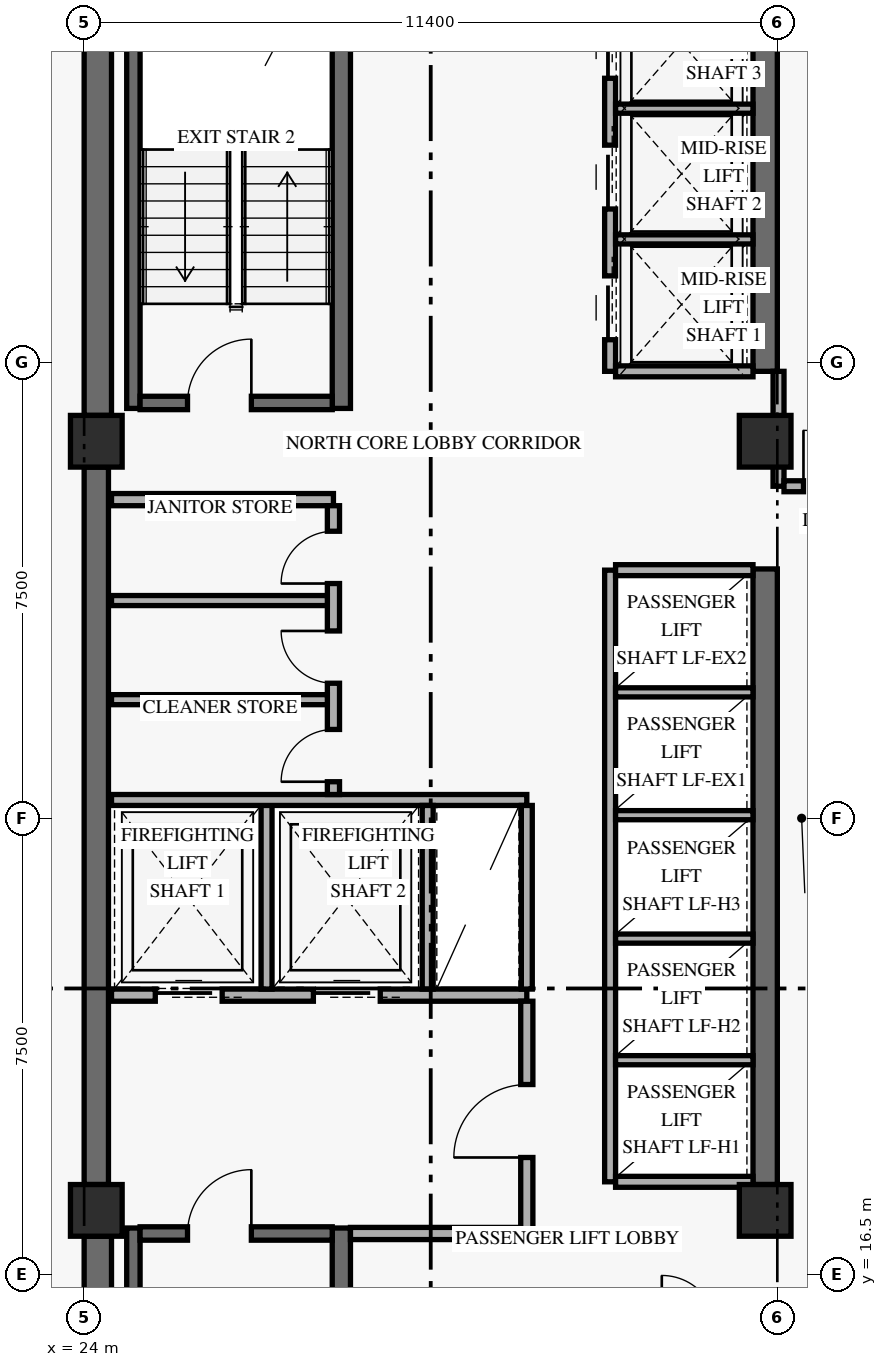
"""IFC4 building model, lengths in metres.
Left out: names, types, materials, properties, quantities, classifications, styles, units other than length and angle.
Written with IfcOpenShell. Run it as: python <this file> out.ifc"""

import sys

from ifc_helpers import new_model, si_unit, direction, frame, frame_2d, origin, origin_2d, place, context, subcontext, project, spatial, rectangle, extrude, element, fill, save


model = new_model("IFC4")
c1 = context("Model", 3, precision=1e-05, world=origin(), true_north=direction((0.0, 1.0)))
c2 = subcontext(c1, "Body", "Model", "MODEL_VIEW")
j1 = project(units=[si_unit("LENGTHUNIT", "METRE"), si_unit("PLANEANGLEUNIT", "RADIAN")], contexts=[c1])
p1 = place(None, origin())
s1 = spatial("IfcSite", under=j1, at=p1, CompositionType="ELEMENT")
p2 = place(p1, origin())
s2 = spatial("IfcBuilding", under=s1, at=p2, CompositionType="ELEMENT")
p3 = place(p2, frame((0.0, 0.0, 113.4)))
s3 = spatial("IfcBuildingStorey", under=s2, at=p3, CompositionType="ELEMENT", Elevation=113.4)
p4 = place(p3, frame((24.225, 9.675, 0.0), z_axis=(0.0, 0.0, 1.0), x_axis=(0.0, 1.0, 0.0)))
e1 = element("IfcWall", 1, at=p4, inside=s3, PredefinedType="SHEAR", context=c2, shape_type="SweptSolid", body=[
    extrude(rectangle(XDim=7.45, YDim=0.45, at=frame_2d((3.725, 0.0))), origin(), (0.0, 0.0, 1.0), 2.739),
])
p5 = place(p3, frame((24.2, 17.975, 0.0), z_axis=(0.0, 0.0, 1.0), x_axis=(0.0, 1.0, 0.0)))
e2 = element("IfcWall", 2, at=p5, inside=s3, PredefinedType="SHEAR", context=c2, shape_type="SweptSolid", body=[
    extrude(rectangle(XDim=11.8, YDim=0.4, at=frame_2d((5.9, 0.0))), origin(), (0.0, 0.0, 1.0), 2.739),
])
p6 = place(p3, frame((24.225, 30.625, 0.0), z_axis=(0.0, 0.0, 1.0), x_axis=(0.0, 1.0, 0.0)))
e3 = element("IfcWall", 3, at=p6, inside=s3, PredefinedType="SHEAR", context=c2, shape_type="SweptSolid", body=[
    extrude(rectangle(XDim=7.7, YDim=0.45, at=frame_2d((3.85, 0.0))), origin(), (0.0, 0.0, 1.0), 2.739),
])
p7 = place(p3, frame((35.2, 17.975, 0.0), z_axis=(0.0, 0.0, 1.0), x_axis=(0.0, 1.0, 0.0)))
e4 = element("IfcWall", 4, at=p7, inside=s3, PredefinedType="SHEAR", context=c2, shape_type="SweptSolid", body=[
    extrude(rectangle(XDim=10.125, YDim=0.4, at=frame_2d((5.062, 0.0))), origin(), (0.0, 0.0, 1.0), 2.739),
])
p8 = place(p3, frame((35.2, 31.35, 0.0), z_axis=(0.0, 0.0, 1.0), x_axis=(0.0, 1.0, 0.0)))
e5 = element("IfcWall", 5, at=p8, inside=s3, PredefinedType="SHEAR", context=c2, shape_type="SweptSolid", body=[
    extrude(rectangle(XDim=6.975, YDim=0.4, at=frame_2d((3.487, 0.0))), origin(), (0.0, 0.0, 1.0), 2.739),
])
p9 = place(p3, frame((24.81, 9.5, 0.0), z_axis=(0.0, 0.0, 1.0), x_axis=(0.0, 1.0, 0.0)))
e6 = element("IfcWall", 6, at=p9, inside=s3, PredefinedType="SHEAR", context=c2, shape_type="SweptSolid", body=[
    extrude(rectangle(XDim=7.76, YDim=0.22, at=frame_2d((3.88, 0.0))), origin(), (0.0, 0.0, 1.0), 3.35),
])
p10 = place(p3, frame((28.23, 9.5, 0.0), z_axis=(0.0, 0.0, 1.0), x_axis=(0.0, 1.0, 0.0)))
e7 = element("IfcWall", 7, at=p10, inside=s3, PredefinedType="SHEAR", context=c2, shape_type="SweptSolid", body=[
    extrude(rectangle(XDim=7.76, YDim=0.3, at=frame_2d((3.88, 0.0))), origin(), (0.0, 0.0, 1.0), 3.35),
])
p11 = place(p3, frame((24.92, 17.17, 0.0), z_axis=(0.0, 0.0, 1.0), x_axis=(1.0, 0.0, 0.0)))
e8 = element("IfcWall", 8, at=p11, inside=s3, PredefinedType="SHEAR", context=c2, shape_type="SweptSolid", body=[
    extrude(rectangle(XDim=3.16, YDim=0.22, at=frame_2d((1.58, 0.0))), origin(), (0.0, 0.0, 1.0), 3.35),
])
p12 = place(p11, frame((0.78, 0.0, 0.0)))
e9 = element("IfcOpeningElement", 9, at=p12, cuts=e8, PredefinedType="OPENING", context=c2, shape_type="SweptSolid", body=[
    extrude(rectangle(XDim=1.05, YDim=2.15, at=frame_2d((0.525, 1.075))), frame((0.0, 0.12, 0.0), z_axis=(0.0, -1.0, 0.0), x_axis=(1.0, 0.0, 0.0)), (0.0, 0.0, 1.0), 0.24),
])
p13 = place(p3, frame((24.81, 30.74, 0.0), z_axis=(0.0, 0.0, 1.0), x_axis=(0.0, 1.0, 0.0)))
e10 = element("IfcWall", 10, at=p13, inside=s3, PredefinedType="SHEAR", context=c2, shape_type="SweptSolid", body=[
    extrude(rectangle(XDim=7.76, YDim=0.22, at=frame_2d((3.88, 0.0))), origin(), (0.0, 0.0, 1.0), 3.35),
])
p14 = place(p3, frame((28.23, 30.74, 0.0), z_axis=(0.0, 0.0, 1.0), x_axis=(0.0, 1.0, 0.0)))
e11 = element("IfcWall", 11, at=p14, inside=s3, PredefinedType="SHEAR", context=c2, shape_type="SweptSolid", body=[
    extrude(rectangle(XDim=7.76, YDim=0.3, at=frame_2d((3.88, 0.0))), origin(), (0.0, 0.0, 1.0), 3.35),
])
p15 = place(p3, frame((24.92, 30.83, 0.0), z_axis=(0.0, 0.0, 1.0), x_axis=(1.0, 0.0, 0.0)))
e12 = element("IfcWall", 12, at=p15, inside=s3, PredefinedType="SHEAR", context=c2, shape_type="SweptSolid", body=[
    extrude(rectangle(XDim=3.16, YDim=0.22, at=frame_2d((1.58, 0.0))), origin(), (0.0, 0.0, 1.0), 3.35),
])
p16 = place(p15, frame((0.78, 0.0, 0.0)))
e13 = element("IfcOpeningElement", 13, at=p16, cuts=e12, PredefinedType="OPENING", context=c2, shape_type="SweptSolid", body=[
    extrude(rectangle(XDim=1.05, YDim=2.15, at=frame_2d((0.525, 1.075))), frame((0.0, 0.12, 0.0), z_axis=(0.0, -1.0, 0.0), x_axis=(1.0, 0.0, 0.0)), (0.0, 0.0, 1.0), 0.24),
])
for number, where, z_axis, x_axis in (
    (14, (24.2, 17.55, 0.0), (0.0, 0.0, 1.0), (1.0, 0.0, 0.0)),
    (15, (24.2, 30.2, 0.0), (0.0, 0.0, 1.0), (1.0, 0.0, 0.0)),
    (16, (35.2, 17.55, 0.0), (0.0, 0.0, 1.0), (1.0, 0.0, 0.0)),
    (17, (35.2, 30.2, 0.0), (0.0, 0.0, 1.0), (1.0, 0.0, 0.0)),
):
    element("IfcColumn", number, at=place(p3, frame(where, z_axis=z_axis, x_axis=x_axis)), inside=s3, PredefinedType="COLUMN", context=c2, shape_type="SweptSolid", body=[
        extrude(rectangle(XDim=0.85, YDim=0.85, at=origin_2d()), origin(), (0.0, 0.0, 1.0), 3.6),
    ])
p17 = place(p3, frame((24.45, 21.09, 0.0), z_axis=(0.0, 0.0, 1.0), x_axis=(1.0, 0.0, 0.0)))
e18 = element("IfcWall", 18, at=p17, inside=s3, PredefinedType="STANDARD", context=c2, shape_type="SweptSolid", body=[
    extrude(rectangle(XDim=6.83, YDim=0.2, at=frame_2d((3.415, 0.0))), origin(), (0.0, 0.0, 1.0), 3.35),
])
p18 = place(p17, frame((0.72, 0.0, 0.0)))
e19 = element("IfcOpeningElement", 19, at=p18, cuts=e18, PredefinedType="OPENING", context=c2, shape_type="SweptSolid", body=[
    extrude(rectangle(XDim=1.1, YDim=2.2, at=frame_2d((0.55, 1.1))), frame((0.0, 0.11, 0.0), z_axis=(0.0, -1.0, 0.0), x_axis=(1.0, 0.0, 0.0)), (0.0, 0.0, 1.0), 0.22),
])
p19 = place(p17, frame((3.32, 0.0, 0.0)))
e20 = element("IfcOpeningElement", 20, at=p19, cuts=e18, PredefinedType="OPENING", context=c2, shape_type="SweptSolid", body=[
    extrude(rectangle(XDim=1.1, YDim=2.2, at=frame_2d((0.55, 1.1))), frame((0.0, 0.11, 0.0), z_axis=(0.0, -1.0, 0.0), x_axis=(1.0, 0.0, 0.0)), (0.0, 0.0, 1.0), 0.22),
])
p20 = place(p3, frame((28.38, 17.17, 0.0), z_axis=(0.0, 0.0, 1.0), x_axis=(1.0, 0.0, 0.0)))
e21 = element("IfcWall", 21, at=p20, inside=s3, PredefinedType="STANDARD", context=c2, shape_type="SweptSolid", body=[
    extrude(rectangle(XDim=2.9, YDim=0.2, at=frame_2d((1.45, 0.0))), origin(), (0.0, 0.0, 1.0), 3.35),
])
p21 = place(p3, frame((31.28, 17.07, 0.0), z_axis=(0.0, 0.0, 1.0), x_axis=(0.0, 1.0, 0.0)))
e22 = element("IfcWall", 22, at=p21, inside=s3, PredefinedType="STANDARD", context=c2, shape_type="SweptSolid", body=[
    extrude(rectangle(XDim=3.92, YDim=0.2, at=frame_2d((1.96, 0.0))), origin(), (0.0, 0.0, 1.0), 2.721),
])
p22 = place(p21, frame((1.35, 0.0, 0.0)))
e23 = element("IfcOpeningElement", 23, at=p22, cuts=e22, PredefinedType="OPENING", context=c2, shape_type="SweptSolid", body=[
    extrude(rectangle(XDim=1.2, YDim=2.15, at=frame_2d((0.6, 1.075))), frame((0.0, 0.11, 0.0), z_axis=(0.0, -1.0, 0.0), x_axis=(1.0, 0.0, 0.0)), (0.0, 0.0, 1.0), 0.22),
])
p23 = place(p3, frame((27.0, 21.19, 0.0), z_axis=(0.0, 0.0, 1.0), x_axis=(0.0, 1.0, 0.0)))
e24 = element("IfcWall", 24, at=p23, inside=s3, PredefinedType="STANDARD", context=c2, shape_type="SweptSolid", body=[
    extrude(rectangle(XDim=3.11, YDim=0.18, at=frame_2d((1.555, 0.0))), origin(), (0.0, 0.0, 1.0), 3.35),
])
p24 = place(p3, frame((24.45, 24.3, 0.0), z_axis=(0.0, 0.0, 1.0), x_axis=(1.0, 0.0, 0.0)))
e25 = element("IfcWall", 25, at=p24, inside=s3, PredefinedType="STANDARD", context=c2, shape_type="SweptSolid", body=[
    extrude(rectangle(XDim=6.83, YDim=0.18, at=frame_2d((3.415, 0.0))), origin(), (0.0, 0.0, 1.0), 3.35),
])
for number, where, z_axis, x_axis in (
    (26, (29.65, 21.19, 0.0), (0.0, 0.0, 1.0), (0.0, 1.0, 0.0)),
    (27, (31.28, 21.19, 0.0), (0.0, 0.0, 1.0), (0.0, 1.0, 0.0)),
):
    element("IfcWall", number, at=place(p3, frame(where, z_axis=z_axis, x_axis=x_axis)), inside=s3, PredefinedType="STANDARD", context=c2, shape_type="SweptSolid", body=[
        extrude(rectangle(XDim=3.02, YDim=0.18, at=frame_2d((1.51, 0.0))), origin(), (0.0, 0.0, 1.0), 3.35),
    ])
p25 = place(p3, frame((24.45, 29.24, 0.0), z_axis=(0.0, 0.0, 1.0), x_axis=(1.0, 0.0, 0.0)))
e28 = element("IfcWall", 28, at=p25, inside=s3, PredefinedType="STANDARD", context=c2, shape_type="SweptSolid", body=[
    extrude(rectangle(XDim=3.65, YDim=0.2, at=frame_2d((1.825, 0.0))), origin(), (0.0, 0.0, 1.0), 3.35),
])
p26 = place(p3, frame((28.1, 24.39, 0.0), z_axis=(0.0, 0.0, 1.0), x_axis=(0.0, 1.0, 0.0)))
e29 = element("IfcWall", 29, at=p26, inside=s3, PredefinedType="STANDARD", context=c2, shape_type="SweptSolid", body=[
    extrude(rectangle(XDim=4.75, YDim=0.2, at=frame_2d((2.375, 0.0))), origin(), (0.0, 0.0, 1.0), 3.35),
])
p27 = place(p26, frame((0.21, 0.0, 0.0)))
e30 = element("IfcOpeningElement", 30, at=p27, cuts=e29, PredefinedType="OPENING", context=c2, shape_type="SweptSolid", body=[
    extrude(rectangle(XDim=0.86, YDim=2.1, at=frame_2d((0.43, 1.05))), frame((0.0, 0.11, 0.0), z_axis=(0.0, -1.0, 0.0), x_axis=(1.0, 0.0, 0.0)), (0.0, 0.0, 1.0), 0.22),
])
p28 = place(p26, frame((1.83, 0.0, 0.0)))
e31 = element("IfcOpeningElement", 31, at=p28, cuts=e29, PredefinedType="OPENING", context=c2, shape_type="SweptSolid", body=[
    extrude(rectangle(XDim=0.86, YDim=2.1, at=frame_2d((0.43, 1.05))), frame((0.0, 0.11, 0.0), z_axis=(0.0, -1.0, 0.0), x_axis=(1.0, 0.0, 0.0)), (0.0, 0.0, 1.0), 0.22),
])
p29 = place(p26, frame((3.47, 0.0, 0.0)))
e32 = element("IfcOpeningElement", 32, at=p29, cuts=e29, PredefinedType="OPENING", context=c2, shape_type="SweptSolid", body=[
    extrude(rectangle(XDim=0.86, YDim=2.1, at=frame_2d((0.43, 1.05))), frame((0.0, 0.11, 0.0), z_axis=(0.0, -1.0, 0.0), x_axis=(1.0, 0.0, 0.0)), (0.0, 0.0, 1.0), 0.22),
])
for number, where, z_axis, x_axis in (
    (33, (24.45, 25.95, 0.0), (0.0, 0.0, 1.0), (1.0, 0.0, 0.0)),
    (34, (24.45, 27.58, 0.0), (0.0, 0.0, 1.0), (1.0, 0.0, 0.0)),
):
    element("IfcWall", number, at=place(p3, frame(where, z_axis=z_axis, x_axis=x_axis)), inside=s3, PredefinedType="PARTITIONING", context=c2, shape_type="SweptSolid", body=[
        extrude(rectangle(XDim=3.55, YDim=0.165, at=frame_2d((1.775, 0.0))), origin(), (0.0, 0.0, 1.0), 3.35),
    ])
p30 = place(p3, frame((32.65, 18.02, 0.0), z_axis=(0.0, 0.0, 1.0), x_axis=(0.0, 1.0, 0.0)))
e35 = element("IfcWall", 35, at=p30, inside=s3, PredefinedType="STANDARD", context=c2, shape_type="SweptSolid", body=[
    extrude(rectangle(XDim=10.06, YDim=0.18, at=frame_2d((5.03, 0.0))), origin(), (0.0, 0.0, 1.0), 3.35),
])
for number, where, z_axis, x_axis in (
    (36, (32.74, 18.02, 0.0), (0.0, 0.0, 1.0), (1.0, 0.0, 0.0)),
    (37, (32.74, 28.08, 0.0), (0.0, 0.0, 1.0), (1.0, 0.0, 0.0)),
):
    element("IfcWall", number, at=place(p3, frame(where, z_axis=z_axis, x_axis=x_axis)), inside=s3, PredefinedType="STANDARD", context=c2, shape_type="SweptSolid", body=[
        extrude(rectangle(XDim=2.26, YDim=0.18, at=frame_2d((1.13, 0.0))), origin(), (0.0, 0.0, 1.0), 3.35),
    ])
for number, where, z_axis, x_axis in (
    (38, (32.74, 20.02, 0.0), (0.0, 0.0, 1.0), (1.0, 0.0, 0.0)),
    (39, (32.74, 22.02, 0.0), (0.0, 0.0, 1.0), (1.0, 0.0, 0.0)),
    (40, (32.74, 24.05, 0.0), (0.0, 0.0, 1.0), (1.0, 0.0, 0.0)),
    (41, (32.74, 26.07, 0.0), (0.0, 0.0, 1.0), (1.0, 0.0, 0.0)),
):
    element("IfcWall", number, at=place(p3, frame(where, z_axis=z_axis, x_axis=x_axis)), inside=s3, PredefinedType="STANDARD", context=c2, shape_type="SweptSolid", body=[
        extrude(rectangle(XDim=2.26, YDim=0.15, at=frame_2d((1.13, 0.0))), origin(), (0.0, 0.0, 1.0), 3.35),
    ])
p31 = place(p3, frame((32.65, 31.35, 0.0), z_axis=(0.0, 0.0, 1.0), x_axis=(0.0, 1.0, 0.0)))
e42 = element("IfcWall", 42, at=p31, inside=s3, PredefinedType="STANDARD", context=c2, shape_type="SweptSolid", body=[
    extrude(rectangle(XDim=7.2, YDim=0.18, at=frame_2d((3.6, 0.0))), origin(), (0.0, 0.0, 1.0), 3.35),
])
p32 = place(p31, frame((0.52, 0.0, 0.0)))
e43 = element("IfcOpeningElement", 43, at=p32, cuts=e42, PredefinedType="OPENING", context=c2, shape_type="SweptSolid", body=[
    extrude(rectangle(XDim=1.05, YDim=2.2, at=frame_2d((0.525, 1.1))), frame((0.0, 0.1, 0.0), z_axis=(0.0, -1.0, 0.0), x_axis=(1.0, 0.0, 0.0)), (0.0, 0.0, 1.0), 0.2),
])
p33 = place(p31, frame((2.67, 0.0, 0.0)))
e44 = element("IfcOpeningElement", 44, at=p33, cuts=e42, PredefinedType="OPENING", context=c2, shape_type="SweptSolid", body=[
    extrude(rectangle(XDim=1.05, YDim=2.2, at=frame_2d((0.525, 1.1))), frame((0.0, 0.1, 0.0), z_axis=(0.0, -1.0, 0.0), x_axis=(1.0, 0.0, 0.0)), (0.0, 0.0, 1.0), 0.2),
])
p34 = place(p31, frame((4.82, 0.0, 0.0)))
e45 = element("IfcOpeningElement", 45, at=p34, cuts=e42, PredefinedType="OPENING", context=c2, shape_type="SweptSolid", body=[
    extrude(rectangle(XDim=1.05, YDim=2.2, at=frame_2d((0.525, 1.1))), frame((0.0, 0.1, 0.0), z_axis=(0.0, -1.0, 0.0), x_axis=(1.0, 0.0, 0.0)), (0.0, 0.0, 1.0), 0.2),
])
p35 = place(p3, frame((32.74, 31.35, 0.0), z_axis=(0.0, 0.0, 1.0), x_axis=(1.0, 0.0, 0.0)))
e46 = element("IfcWall", 46, at=p35, inside=s3, PredefinedType="STANDARD", context=c2, shape_type="SweptSolid", body=[
    extrude(rectangle(XDim=2.26, YDim=0.18, at=frame_2d((1.13, 0.0))), origin(), (0.0, 0.0, 1.0), 3.35),
])
for number, where, z_axis, x_axis in (
    (47, (32.74, 33.52, 0.0), (0.0, 0.0, 1.0), (1.0, 0.0, 0.0)),
    (48, (32.74, 35.67, 0.0), (0.0, 0.0, 1.0), (1.0, 0.0, 0.0)),
):
    element("IfcWall", number, at=place(p3, frame(where, z_axis=z_axis, x_axis=x_axis)), inside=s3, PredefinedType="STANDARD", context=c2, shape_type="SweptSolid", body=[
        extrude(rectangle(XDim=2.26, YDim=0.15, at=frame_2d((1.13, 0.0))), origin(), (0.0, 0.0, 1.0), 3.35),
    ])
p36 = place(p3, frame((35.42, 29.46, 0.0), z_axis=(0.0, 0.0, 1.0), x_axis=(0.0, 1.0, 0.0)))
e49 = element("IfcWall", 49, at=p36, inside=s3, PredefinedType="STANDARD", context=c2, shape_type="SweptSolid", body=[
    extrude(rectangle(XDim=1.89, YDim=0.18, at=frame_2d((0.945, 0.0))), origin(), (0.0, 0.0, 1.0), 2.721),
])
p37 = place(p3, frame((35.51, 29.46, 0.0), z_axis=(0.0, 0.0, 1.0), x_axis=(1.0, 0.0, 0.0)))
e50 = element("IfcWall", 50, at=p37, inside=s3, PredefinedType="STANDARD", context=c2, shape_type="SweptSolid", body=[
    extrude(rectangle(XDim=10.09, YDim=0.18, at=frame_2d((5.045, 0.0))), origin(), (0.0, 0.0, 1.0), 2.721),
])
p38 = place(p37, frame((0.32, 0.0, 0.0)))
e51 = element("IfcOpeningElement", 51, at=p38, cuts=e50, PredefinedType="OPENING", context=c2, shape_type="SweptSolid", body=[
    extrude(rectangle(XDim=0.92, YDim=2.15, at=frame_2d((0.46, 1.075))), frame((0.0, 0.1, 0.0), z_axis=(0.0, -1.0, 0.0), x_axis=(1.0, 0.0, 0.0)), (0.0, 0.0, 1.0), 0.2),
])
p39 = place(p12, frame((1.05, 0.0, 0.0), z_axis=(0.0, 0.0, 1.0), x_axis=(-1.0, 0.0, 0.0)))
e52 = element("IfcDoor", 52, at=p39, inside=s3, OperationType="SINGLE_SWING_LEFT", PredefinedType="DOOR", context=c2, shape_type="SweptSolid", body=[
    extrude(rectangle(XDim=1.05, YDim=2.15, at=frame_2d((0.525, 1.075))), frame((0.0, 0.025, 0.0), z_axis=(0.0, -1.0, 0.0), x_axis=(1.0, 0.0, 0.0)), (0.0, 0.0, 1.0), 0.05),
])
fill(e9, e52)
p40 = place(p16, origin())
e53 = element("IfcDoor", 53, at=p40, inside=s3, OperationType="SINGLE_SWING_RIGHT", PredefinedType="DOOR", context=c2, shape_type="SweptSolid", body=[
    extrude(rectangle(XDim=1.05, YDim=2.15, at=frame_2d((0.525, 1.075))), frame((0.0, 0.025, 0.0), z_axis=(0.0, -1.0, 0.0), x_axis=(1.0, 0.0, 0.0)), (0.0, 0.0, 1.0), 0.05),
])
fill(e13, e53)
p41 = place(p18, origin())
e54 = element("IfcDoor", 54, at=p41, inside=s3, OperationType="SLIDING_TO_LEFT", PredefinedType="DOOR", context=c2, shape_type="SweptSolid", body=[
    extrude(rectangle(XDim=1.1, YDim=2.2, at=frame_2d((0.55, 1.1))), frame((0.0, 0.025, 0.0), z_axis=(0.0, -1.0, 0.0), x_axis=(1.0, 0.0, 0.0)), (0.0, 0.0, 1.0), 0.05),
])
fill(e19, e54)
p42 = place(p19, origin())
e55 = element("IfcDoor", 55, at=p42, inside=s3, OperationType="SLIDING_TO_LEFT", PredefinedType="DOOR", context=c2, shape_type="SweptSolid", body=[
    extrude(rectangle(XDim=1.1, YDim=2.2, at=frame_2d((0.55, 1.1))), frame((0.0, 0.025, 0.0), z_axis=(0.0, -1.0, 0.0), x_axis=(1.0, 0.0, 0.0)), (0.0, 0.0, 1.0), 0.05),
])
fill(e20, e55)
p43 = place(p22, origin())
e56 = element("IfcDoor", 56, at=p43, inside=s3, OperationType="SINGLE_SWING_LEFT", PredefinedType="DOOR", context=c2, shape_type="SweptSolid", body=[
    extrude(rectangle(XDim=1.2, YDim=2.15, at=frame_2d((0.6, 1.075))), frame((0.0, 0.025, 0.0), z_axis=(0.0, -1.0, 0.0), x_axis=(1.0, 0.0, 0.0)), (0.0, 0.0, 1.0), 0.05),
])
fill(e23, e56)
p44 = place(p27, origin())
e57 = element("IfcDoor", 57, at=p44, inside=s3, OperationType="SINGLE_SWING_LEFT", PredefinedType="DOOR", context=c2, shape_type="SweptSolid", body=[
    extrude(rectangle(XDim=0.86, YDim=2.1, at=frame_2d((0.43, 1.05))), frame((0.0, 0.025, 0.0), z_axis=(0.0, -1.0, 0.0), x_axis=(1.0, 0.0, 0.0)), (0.0, 0.0, 1.0), 0.05),
])
fill(e30, e57)
p45 = place(p28, origin())
e58 = element("IfcDoor", 58, at=p45, inside=s3, OperationType="SINGLE_SWING_RIGHT", PredefinedType="DOOR", context=c2, shape_type="SweptSolid", body=[
    extrude(rectangle(XDim=0.86, YDim=2.1, at=frame_2d((0.43, 1.05))), frame((0.0, 0.025, 0.0), z_axis=(0.0, -1.0, 0.0), x_axis=(1.0, 0.0, 0.0)), (0.0, 0.0, 1.0), 0.05),
])
fill(e31, e58)
p46 = place(p29, origin())
e59 = element("IfcDoor", 59, at=p46, inside=s3, OperationType="SINGLE_SWING_LEFT", PredefinedType="DOOR", context=c2, shape_type="SweptSolid", body=[
    extrude(rectangle(XDim=0.86, YDim=2.1, at=frame_2d((0.43, 1.05))), frame((0.0, 0.025, 0.0), z_axis=(0.0, -1.0, 0.0), x_axis=(1.0, 0.0, 0.0)), (0.0, 0.0, 1.0), 0.05),
])
fill(e32, e59)
p47 = place(p32, origin())
e60 = element("IfcDoor", 60, at=p47, inside=s3, OperationType="SLIDING_TO_LEFT", PredefinedType="DOOR", context=c2, shape_type="SweptSolid", body=[
    extrude(rectangle(XDim=1.05, YDim=2.2, at=frame_2d((0.525, 1.1))), frame((0.0, 0.025, 0.0), z_axis=(0.0, -1.0, 0.0), x_axis=(1.0, 0.0, 0.0)), (0.0, 0.0, 1.0), 0.05),
])
fill(e43, e60)
p48 = place(p33, origin())
e61 = element("IfcDoor", 61, at=p48, inside=s3, OperationType="SLIDING_TO_LEFT", PredefinedType="DOOR", context=c2, shape_type="SweptSolid", body=[
    extrude(rectangle(XDim=1.05, YDim=2.2, at=frame_2d((0.525, 1.1))), frame((0.0, 0.025, 0.0), z_axis=(0.0, -1.0, 0.0), x_axis=(1.0, 0.0, 0.0)), (0.0, 0.0, 1.0), 0.05),
])
fill(e44, e61)
p49 = place(p34, origin())
e62 = element("IfcDoor", 62, at=p49, inside=s3, OperationType="SLIDING_TO_LEFT", PredefinedType="DOOR", context=c2, shape_type="SweptSolid", body=[
    extrude(rectangle(XDim=1.05, YDim=2.2, at=frame_2d((0.525, 1.1))), frame((0.0, 0.025, 0.0), z_axis=(0.0, -1.0, 0.0), x_axis=(1.0, 0.0, 0.0)), (0.0, 0.0, 1.0), 0.05),
])
fill(e45, e62)
p50 = place(p38, origin())
e63 = element("IfcDoor", 63, at=p50, inside=s3, OperationType="SINGLE_SWING_LEFT", PredefinedType="DOOR", context=c2, shape_type="SweptSolid", body=[
    extrude(rectangle(XDim=0.92, YDim=2.15, at=frame_2d((0.46, 1.075))), frame((0.0, 0.025, 0.0), z_axis=(0.0, -1.0, 0.0), x_axis=(1.0, 0.0, 0.0)), (0.0, 0.0, 1.0), 0.05),
])
fill(e51, e63)
save(model, sys.argv[1])
